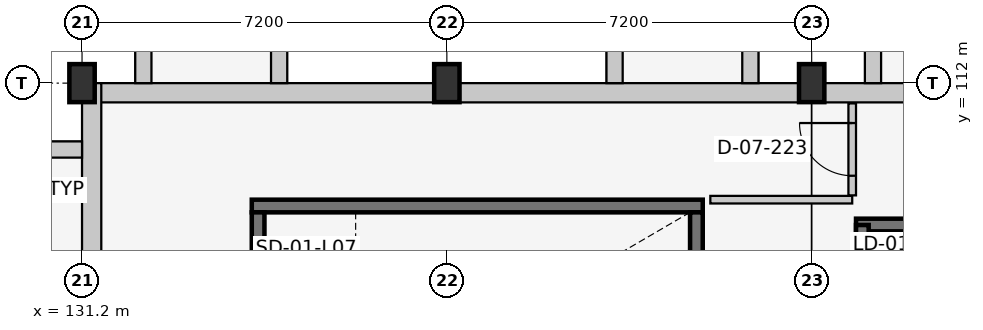
"""IFC4 building model, lengths in metres.
Left out: names, types, materials, properties, quantities, classifications, styles, units other than length and angle.
Written with IfcOpenShell. Run it as: python <this file> out.ifc"""

import sys

from ifc_helpers import new_model, si_unit, direction, frame, frame_2d, origin, origin_2d, place, context, subcontext, project, spatial, rectangle, extrude, element, fill, save


model = new_model("IFC4")
c1 = context("Model", 3, precision=1e-05, world=origin(), true_north=direction((0.0, 1.0)))
c2 = subcontext(c1, "Body", "Model", "MODEL_VIEW")
j1 = project(units=[si_unit("LENGTHUNIT", "METRE"), si_unit("PLANEANGLEUNIT", "RADIAN")], contexts=[c1])
p1 = place(None, origin())
s1 = spatial("IfcSite", under=j1, at=p1, CompositionType="ELEMENT")
p2 = place(p1, origin())
s2 = spatial("IfcBuilding", under=s1, at=p2, CompositionType="ELEMENT")
p3 = place(p2, frame((0.0, 0.0, 29.7)))
s3 = spatial("IfcBuildingStorey", under=s2, at=p3, CompositionType="ELEMENT", Elevation=29.7)
for number, where, z_axis, x_axis in (
    (1, (131.2, 112.0, 0.0), (0.0, 0.0, 1.0), (1.0, 0.0, 0.0)),
    (2, (138.4, 112.0, 0.0), (0.0, 0.0, 1.0), (1.0, 0.0, 0.0)),
    (3, (145.6, 112.0, 0.0), (0.0, 0.0, 1.0), (1.0, 0.0, 0.0)),
):
    element("IfcColumn", number, at=place(p3, frame(where, z_axis=z_axis, x_axis=x_axis)), inside=s3, PredefinedType="COLUMN", context=c2, shape_type="SweptSolid", body=[
        extrude(rectangle(XDim=0.5, YDim=0.75, at=origin_2d()), origin(), (0.0, 0.0, 1.0), 4.2),
    ])
p4 = place(p3, frame((131.2, 111.81, 0.0), z_axis=(0.0, 0.0, 1.0), x_axis=(1.0, 0.0, 0.0)))
e4 = element("IfcWall", 4, at=p4, inside=s3, PredefinedType="SOLIDWALL", context=c2, shape_type="SweptSolid", body=[
    extrude(rectangle(XDim=28.8, YDim=0.38, at=frame_2d((14.4, 0.0))), origin(), (0.0, 0.0, 1.0), 3.495),
])
p5 = place(p3, frame((132.41, 112.0, 0.0), z_axis=(0.0, 0.0, 1.0), x_axis=(0.0, 1.0, 0.0)))
e5 = element("IfcWall", 5, at=p5, inside=s3, PredefinedType="SOLIDWALL", context=c2, shape_type="SweptSolid", body=[
    extrude(rectangle(XDim=1.793, YDim=0.32, at=frame_2d((0.896, 0.0))), origin(), (0.0, 0.0, 1.0), 4.18),
])
for number, where, z_axis, x_axis in (
    (6, (135.09, 112.0, 0.0), (0.0, 0.0, 1.0), (0.0, 1.0, 0.0)),
    (7, (141.71, 112.0, 0.0), (0.0, 0.0, 1.0), (0.0, 1.0, 0.0)),
):
    element("IfcWall", number, at=place(p3, frame(where, z_axis=z_axis, x_axis=x_axis)), inside=s3, PredefinedType="SOLIDWALL", context=c2, shape_type="SweptSolid", body=[
        extrude(rectangle(XDim=1.35, YDim=0.32, at=frame_2d((0.675, 0.0))), origin(), (0.0, 0.0, 1.0), 4.18),
    ])
for number, where, z_axis, x_axis in (
    (8, (144.39, 112.0, 0.0), (0.0, 0.0, 1.0), (0.0, 1.0, 0.0)),
    (9, (146.81, 112.0, 0.0), (0.0, 0.0, 1.0), (0.0, 1.0, 0.0)),
):
    element("IfcWall", number, at=place(p3, frame(where, z_axis=z_axis, x_axis=x_axis)), inside=s3, PredefinedType="SOLIDWALL", context=c2, shape_type="SweptSolid", body=[
        extrude(rectangle(XDim=1.793, YDim=0.32, at=frame_2d((0.896, 0.0))), origin(), (0.0, 0.0, 1.0), 4.18),
    ])
p6 = place(p3, frame((131.39, 83.2, 0.0), z_axis=(0.0, 0.0, 1.0), x_axis=(0.0, 1.0, 0.0)))
e10 = element("IfcWall", 10, at=p6, inside=s3, PredefinedType="SOLIDWALL", context=c2, shape_type="SweptSolid", body=[
    extrude(rectangle(XDim=28.8, YDim=0.38, at=frame_2d((14.4, 0.0))), origin(), (0.0, 0.0, 1.0), 3.455),
])
p7 = place(p6, frame((10.2, 0.0, 0.0)))
e11 = element("IfcOpeningElement", 11, at=p7, cuts=e10, PredefinedType="OPENING", context=c2, shape_type="SweptSolid", body=[
    extrude(rectangle(XDim=1.2, YDim=2.15, at=frame_2d((0.6, 1.075))), frame((0.0, 0.202, 0.0), z_axis=(0.0, -1.0, 0.0), x_axis=(1.0, 0.0, 0.0)), (0.0, 0.0, 1.0), 0.404),
])
p8 = place(p3, frame((131.2, 110.69, 0.0), z_axis=(0.0, 0.0, 1.0), x_axis=(-1.0, 0.0, 0.0)))
e12 = element("IfcWall", 12, at=p8, inside=s3, PredefinedType="SOLIDWALL", context=c2, shape_type="SweptSolid", body=[
    extrude(rectangle(XDim=1.793, YDim=0.32, at=frame_2d((0.896, 0.0))), origin(), (0.0, 0.0, 1.0), 4.18),
])
p9 = place(p3, frame((143.45, 109.575, 0.0), z_axis=(0.0, 0.0, 1.0), x_axis=(-1.0, 0.0, 0.0)))
e13 = element("IfcWall", 13, at=p9, inside=s3, PredefinedType="SHEAR", context=c2, shape_type="SweptSolid", body=[
    extrude(rectangle(XDim=8.9, YDim=0.25, at=frame_2d((4.45, 0.0))), origin(), (0.0, 0.0, 1.0), 4.2),
])
p10 = place(p3, frame((134.675, 109.45, 0.0), z_axis=(0.0, 0.0, 1.0), x_axis=(0.0, -1.0, 0.0)))
e14 = element("IfcWall", 14, at=p10, inside=s3, PredefinedType="SHEAR", context=c2, shape_type="SweptSolid", body=[
    extrude(rectangle(XDim=3.85, YDim=0.25, at=frame_2d((1.925, 0.0))), origin(), (0.0, 0.0, 1.0), 4.2),
])
p11 = place(p10, frame((1.3, 0.0, 0.0)))
e15 = element("IfcOpeningElement", 15, at=p11, cuts=e14, PredefinedType="OPENING", context=c2, shape_type="SweptSolid", body=[
    extrude(rectangle(XDim=1.25, YDim=2.15, at=frame_2d((0.625, 1.075))), frame((0.0, 0.137, 0.0), z_axis=(0.0, -1.0, 0.0), x_axis=(1.0, 0.0, 0.0)), (0.0, 0.0, 1.0), 0.274),
])
p12 = place(p3, frame((143.325, 105.6, 0.0), z_axis=(0.0, 0.0, 1.0), x_axis=(0.0, 1.0, 0.0)))
e16 = element("IfcWall", 16, at=p12, inside=s3, PredefinedType="SHEAR", context=c2, shape_type="SweptSolid", body=[
    extrude(rectangle(XDim=3.85, YDim=0.25, at=frame_2d((1.925, 0.0))), origin(), (0.0, 0.0, 1.0), 4.2),
])
p13 = place(p3, frame((148.925, 109.2, 0.0), z_axis=(0.0, 0.0, 1.0), x_axis=(-1.0, 0.0, 0.0)))
e17 = element("IfcWall", 17, at=p13, inside=s3, PredefinedType="SHEAR", context=c2, shape_type="SweptSolid", body=[
    extrude(rectangle(XDim=2.45, YDim=0.25, at=frame_2d((1.225, 0.0))), origin(), (0.0, 0.0, 1.0), 4.2),
])
p14 = place(p3, frame((146.6, 109.2, 0.0), z_axis=(0.0, 0.0, 1.0), x_axis=(0.0, -1.0, 0.0)))
e18 = element("IfcWall", 18, at=p14, inside=s3, PredefinedType="SHEAR", context=c2, shape_type="SweptSolid", body=[
    extrude(rectangle(XDim=3.0, YDim=0.25, at=frame_2d((1.5, 0.0))), origin(), (0.0, 0.0, 1.0), 4.2),
])
p15 = place(p3, frame((143.6, 109.7, 0.0), z_axis=(0.0, 0.0, 1.0), x_axis=(1.0, 0.0, 0.0)))
e19 = element("IfcWall", 19, at=p15, inside=s3, PredefinedType="PARTITIONING", context=c2, shape_type="SweptSolid", body=[
    extrude(rectangle(XDim=2.8, YDim=0.15, at=frame_2d((1.4, 0.0))), origin(), (0.0, 0.0, 1.0), 4.2),
])
p16 = place(p3, frame((146.4, 109.785, 0.0), z_axis=(0.0, 0.0, 1.0), x_axis=(0.0, 1.0, 0.0)))
e20 = element("IfcWall", 20, at=p16, inside=s3, PredefinedType="PARTITIONING", context=c2, shape_type="SweptSolid", body=[
    extrude(rectangle(XDim=1.815, YDim=0.15, at=frame_2d((0.908, 0.0))), origin(), (0.0, 0.0, 1.0), 4.2),
])
p17 = place(p16, frame((0.387, 0.0, 0.0)))
e21 = element("IfcOpeningElement", 21, at=p17, cuts=e20, PredefinedType="OPENING", context=c2, shape_type="SweptSolid", body=[
    extrude(rectangle(XDim=1.04, YDim=2.15, at=frame_2d((0.52, 1.075))), frame((0.0, 0.087, 0.0), z_axis=(0.0, -1.0, 0.0), x_axis=(1.0, 0.0, 0.0)), (0.0, 0.0, 1.0), 0.174),
])
p18 = place(p17, origin())
e22 = element("IfcDoor", 22, at=p18, inside=s3, OperationType="SINGLE_SWING_RIGHT", PredefinedType="DOOR", context=c2, shape_type="SweptSolid", body=[
    extrude(rectangle(XDim=1.04, YDim=2.15, at=frame_2d((0.52, 1.075))), frame((0.0, 0.025, 0.0), z_axis=(0.0, -1.0, 0.0), x_axis=(1.0, 0.0, 0.0)), (0.0, 0.0, 1.0), 0.05),
])
fill(e21, e22)
save(model, sys.argv[1])
